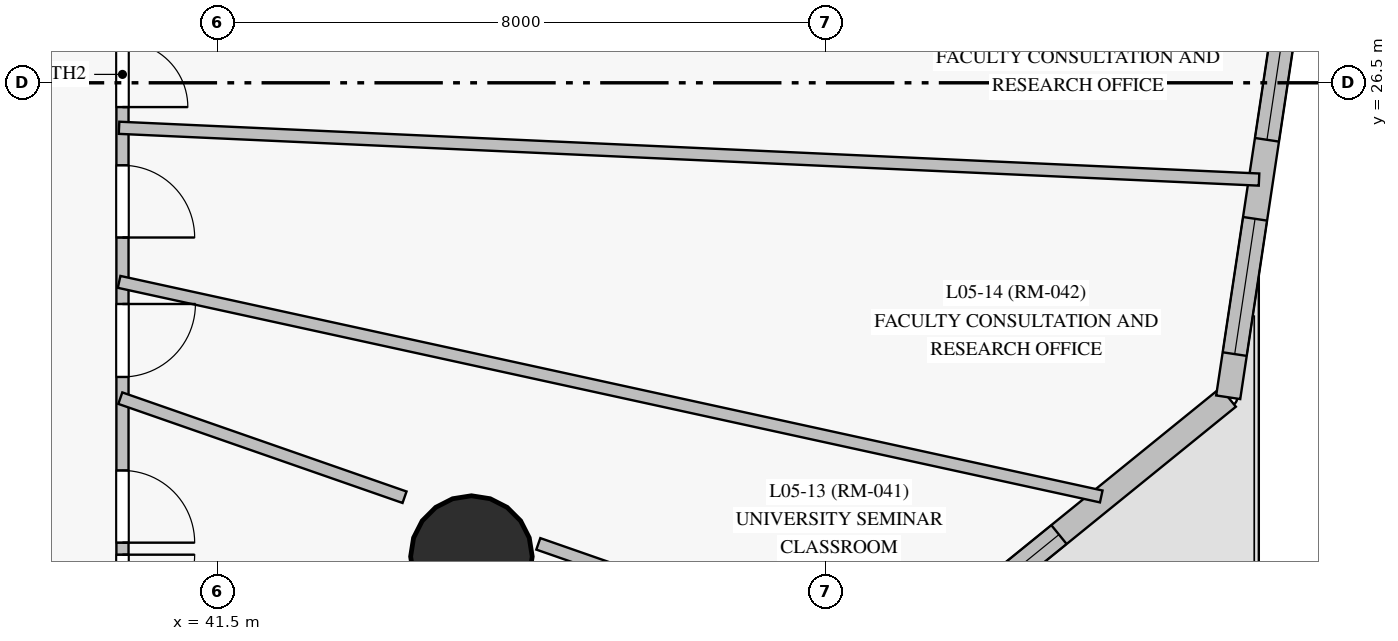
"""IFC4 building model, lengths in metres.
Left out: names, types, materials, properties, quantities, classifications, styles, units other than length and angle.
Written with IfcOpenShell. Run it as: python <this file> out.ifc"""

import sys

from ifc_helpers import new_model, si_unit, direction, frame, frame_2d, origin, origin_with_axes, origin_2d, place, context, subcontext, project, spatial, rectangle, circle, extrude, source, transform, mapped, element, fill, save


model = new_model("IFC4")
c1 = context("Model", 3, precision=1e-05, world=origin(), true_north=direction((0.0, 1.0)))
c2 = subcontext(c1, "Body", "Model", "MODEL_VIEW")
j1 = project(units=[si_unit("LENGTHUNIT", "METRE"), si_unit("PLANEANGLEUNIT", "RADIAN")], contexts=[c1])
p1 = place(None, origin())
s1 = spatial("IfcSite", under=j1, at=p1, CompositionType="ELEMENT")
p2 = place(p1, origin())
s2 = spatial("IfcBuilding", under=s1, at=p2, CompositionType="ELEMENT")
p3 = place(p2, frame((0.0, 0.0, 22.5)))
s3 = spatial("IfcBuildingStorey", under=s2, at=p3, CompositionType="ELEMENT", Elevation=22.5)
m1 = source(origin_with_axes(), c2, "Body", "SweptSolid", [
    extrude(circle(Radius=0.8, at=origin_2d()), origin(), (0.0, 0.0, 1.0), 4.0),
])
p4 = place(p3, frame((44.841, 20.267, 0.0), z_axis=(0.0, 0.0, 1.0), x_axis=(1.0, 0.0, 0.0)))
e1 = element("IfcColumn", 1, at=p4, inside=s3, PredefinedType="COLUMN", context=c2, shape_type="MappedRepresentation", body=[
    mapped(m1, transform((0.0, 0.0, 0.0), scale=1.0)),
])
p5 = place(p3, frame((42.227, 12.163, 0.0), z_axis=(0.0, 0.0, 1.0), x_axis=(0.776540545202, 0.630067283437, 0.0)))
e2 = element("IfcWall", 2, at=p5, inside=s3, PredefinedType="SOLIDWALL", context=c2, shape_type="SweptSolid", body=[
    extrude(rectangle(XDim=16.188, YDim=0.32, at=frame_2d((8.094, 0.0))), origin(), (0.0, 0.0, 1.0), 3.75),
])
p6 = place(p5, frame((0.678, 0.0, 0.85)))
e3 = element("IfcOpeningElement", 3, at=p6, cuts=e2, PredefinedType="OPENING", context=c2, shape_type="SweptSolid", body=[
    extrude(rectangle(XDim=2.1, YDim=1.95, at=frame_2d((1.05, 0.975))), frame((0.0, 0.17, 0.0), z_axis=(0.0, -1.0, 0.0), x_axis=(1.0, 0.0, 0.0)), (0.0, 0.0, 1.0), 0.34),
])
p7 = place(p5, frame((5.896, 0.0, 0.85)))
e4 = element("IfcOpeningElement", 4, at=p7, cuts=e2, PredefinedType="OPENING", context=c2, shape_type="SweptSolid", body=[
    extrude(rectangle(XDim=2.1, YDim=1.95, at=frame_2d((1.05, 0.975))), frame((0.0, 0.17, 0.0), z_axis=(0.0, -1.0, 0.0), x_axis=(1.0, 0.0, 0.0)), (0.0, 0.0, 1.0), 0.34),
])
p8 = place(p5, frame((11.221, 0.0, 0.85)))
e5 = element("IfcOpeningElement", 5, at=p8, cuts=e2, PredefinedType="OPENING", context=c2, shape_type="SweptSolid", body=[
    extrude(rectangle(XDim=2.1, YDim=1.95, at=frame_2d((1.05, 0.975))), frame((0.0, 0.17, 0.0), z_axis=(0.0, -1.0, 0.0), x_axis=(1.0, 0.0, 0.0)), (0.0, 0.0, 1.0), 0.34),
])
p9 = place(p3, frame((54.797, 22.363, 0.0), z_axis=(0.0, 0.0, 1.0), x_axis=(0.148832722849, 0.988862387094, 0.0)))
e6 = element("IfcWall", 6, at=p9, inside=s3, PredefinedType="SOLIDWALL", context=c2, shape_type="SweptSolid", body=[
    extrude(rectangle(XDim=10.767, YDim=0.32, at=frame_2d((5.384, 0.0))), origin(), (0.0, 0.0, 1.0), 3.75),
])
p10 = place(p9, frame((0.574, 0.0, 0.85)))
e7 = element("IfcOpeningElement", 7, at=p10, cuts=e6, PredefinedType="OPENING", context=c2, shape_type="SweptSolid", body=[
    extrude(rectangle(XDim=1.8, YDim=1.85, at=frame_2d((0.9, 0.925))), frame((0.0, 0.17, 0.0), z_axis=(0.0, -1.0, 0.0), x_axis=(1.0, 0.0, 0.0)), (0.0, 0.0, 1.0), 0.34),
])
p11 = place(p9, frame((3.426, 0.0, 0.85)))
e8 = element("IfcOpeningElement", 8, at=p11, cuts=e6, PredefinedType="OPENING", context=c2, shape_type="SweptSolid", body=[
    extrude(rectangle(XDim=2.1, YDim=1.95, at=frame_2d((1.05, 0.975))), frame((0.0, 0.17, 0.0), z_axis=(0.0, -1.0, 0.0), x_axis=(1.0, 0.0, 0.0)), (0.0, 0.0, 1.0), 0.34),
])
p12 = place(p9, frame((8.734, 0.0, 0.85)))
e9 = element("IfcOpeningElement", 9, at=p12, cuts=e6, PredefinedType="OPENING", context=c2, shape_type="SweptSolid", body=[
    extrude(rectangle(XDim=1.5, YDim=1.85, at=frame_2d((0.75, 0.925))), frame((0.0, 0.17, 0.0), z_axis=(0.0, -1.0, 0.0), x_axis=(1.0, 0.0, 0.0)), (0.0, 0.0, 1.0), 0.34),
])
p13 = place(p3, frame((40.25, 37.65, 0.0), z_axis=(0.0, 0.0, 1.0), x_axis=(0.0, -1.0, 0.0)))
e10 = element("IfcWall", 10, at=p13, inside=s3, PredefinedType="PARTITIONING", context=c2, shape_type="SweptSolid", body=[
    extrude(rectangle(XDim=22.3, YDim=0.16, at=frame_2d((11.15, 0.0))), origin(), (0.0, 0.0, 1.0), 3.15),
])
p14 = place(p13, frame((16.25, 0.0, 0.0)))
e11 = element("IfcOpeningElement", 11, at=p14, cuts=e10, PredefinedType="OPENING", context=c2, shape_type="SweptSolid", body=[
    extrude(rectangle(XDim=0.95, YDim=2.15, at=frame_2d((0.475, 1.075))), frame((0.0, 0.09, 0.0), z_axis=(0.0, -1.0, 0.0), x_axis=(1.0, 0.0, 0.0)), (0.0, 0.0, 1.0), 0.18),
])
p15 = place(p13, frame((14.06, 0.0, 0.0)))
e12 = element("IfcOpeningElement", 12, at=p15, cuts=e10, PredefinedType="OPENING", context=c2, shape_type="SweptSolid", body=[
    extrude(rectangle(XDim=0.96, YDim=2.15, at=frame_2d((0.48, 1.075))), frame((0.0, 0.09, 0.0), z_axis=(0.0, -1.0, 0.0), x_axis=(1.0, 0.0, 0.0)), (0.0, 0.0, 1.0), 0.18),
])
p16 = place(p13, frame((12.235, 0.0, 0.0)))
e13 = element("IfcOpeningElement", 13, at=p16, cuts=e10, PredefinedType="OPENING", context=c2, shape_type="SweptSolid", body=[
    extrude(rectangle(XDim=0.95, YDim=2.15, at=frame_2d((0.475, 1.075))), frame((0.0, 0.09, 0.0), z_axis=(0.0, -1.0, 0.0), x_axis=(1.0, 0.0, 0.0)), (0.0, 0.0, 1.0), 0.18),
])
p17 = place(p13, frame((4.385, 0.0, 0.0)))
e14 = element("IfcOpeningElement", 14, at=p17, cuts=e10, PredefinedType="OPENING", context=c2, shape_type="SweptSolid", body=[
    extrude(rectangle(XDim=0.95, YDim=2.15, at=frame_2d((0.475, 1.075))), frame((0.0, 0.09, 0.0), z_axis=(0.0, -1.0, 0.0), x_axis=(1.0, 0.0, 0.0)), (0.0, 0.0, 1.0), 0.18),
])
p18 = place(p13, frame((2.19, 0.0, 0.0)))
e15 = element("IfcOpeningElement", 15, at=p18, cuts=e10, PredefinedType="OPENING", context=c2, shape_type="SweptSolid", body=[
    extrude(rectangle(XDim=0.95, YDim=2.15, at=frame_2d((0.475, 1.075))), frame((0.0, 0.09, 0.0), z_axis=(0.0, -1.0, 0.0), x_axis=(1.0, 0.0, 0.0)), (0.0, 0.0, 1.0), 0.18),
])
p19 = place(p13, frame((17.358, 0.0, 0.0)))
e16 = element("IfcOpeningElement", 16, at=p19, cuts=e10, PredefinedType="OPENING", context=c2, shape_type="SweptSolid", body=[
    extrude(rectangle(XDim=0.95, YDim=2.15, at=frame_2d((0.475, 1.075))), frame((0.0, 0.09, 0.0), z_axis=(0.0, -1.0, 0.0), x_axis=(1.0, 0.0, 0.0)), (0.0, 0.0, 1.0), 0.18),
])
p20 = place(p13, frame((18.489, 0.0, 0.0)))
e17 = element("IfcOpeningElement", 17, at=p20, cuts=e10, PredefinedType="OPENING", context=c2, shape_type="SweptSolid", body=[
    extrude(rectangle(XDim=0.95, YDim=2.15, at=frame_2d((0.475, 1.075))), frame((0.0, 0.09, 0.0), z_axis=(0.0, -1.0, 0.0), x_axis=(1.0, 0.0, 0.0)), (0.0, 0.0, 1.0), 0.18),
])
p21 = place(p13, frame((10.61, 0.0, 0.0)))
e18 = element("IfcOpeningElement", 18, at=p21, cuts=e10, PredefinedType="OPENING", context=c2, shape_type="SweptSolid", body=[
    extrude(rectangle(XDim=0.86, YDim=2.04, at=frame_2d((0.43, 1.02))), frame((0.0, 0.09, 0.0), z_axis=(0.0, -1.0, 0.0), x_axis=(1.0, 0.0, 0.0)), (0.0, 0.0, 1.0), 0.18),
])
p22 = place(p13, frame((8.378, 0.0, 0.0)))
e19 = element("IfcOpeningElement", 19, at=p22, cuts=e10, PredefinedType="OPENING", context=c2, shape_type="SweptSolid", body=[
    extrude(rectangle(XDim=0.86, YDim=2.04, at=frame_2d((0.43, 1.02))), frame((0.0, 0.09, 0.0), z_axis=(0.0, -1.0, 0.0), x_axis=(1.0, 0.0, 0.0)), (0.0, 0.0, 1.0), 0.18),
])
p23 = place(p13, frame((7.144, 0.0, 0.0)))
e20 = element("IfcOpeningElement", 20, at=p23, cuts=e10, PredefinedType="OPENING", context=c2, shape_type="SweptSolid", body=[
    extrude(rectangle(XDim=0.86, YDim=2.04, at=frame_2d((0.43, 1.02))), frame((0.0, 0.09, 0.0), z_axis=(0.0, -1.0, 0.0), x_axis=(1.0, 0.0, 0.0)), (0.0, 0.0, 1.0), 0.18),
])
p24 = place(p3, frame((40.205, 25.908, 0.0), z_axis=(0.0, 0.0, 1.0), x_axis=(0.998969512327, -0.045386269292, 0.0)))
e21 = element("IfcWall", 21, at=p24, inside=s3, PredefinedType="PARTITIONING", context=c2, shape_type="SweptSolid", body=[
    extrude(rectangle(XDim=15.013, YDim=0.16, at=frame_2d((7.507, 0.0))), origin(), (0.0, 0.0, 1.0), 3.75),
])
p25 = place(p3, frame((40.206, 23.881, 0.0), z_axis=(0.0, 0.0, 1.0), x_axis=(0.976950568719, -0.213465655972, 0.0)))
e22 = element("IfcWall", 22, at=p25, inside=s3, PredefinedType="PARTITIONING", context=c2, shape_type="SweptSolid", body=[
    extrude(rectangle(XDim=13.226, YDim=0.16, at=frame_2d((6.613, 0.0))), origin(), (0.0, 0.0, 1.0), 3.75),
])
p26 = place(p3, frame((45.721, 20.434, 0.0), z_axis=(0.0, 0.0, 1.0), x_axis=(0.944295205847, -0.329099626578, 0.0)))
e23 = element("IfcWall", 23, at=p26, inside=s3, PredefinedType="PARTITIONING", context=c2, shape_type="SweptSolid", body=[
    extrude(rectangle(XDim=4.922, YDim=0.16, at=frame_2d((2.461, 0.0))), origin(), (0.0, 0.0, 1.0), 3.75),
])
p27 = place(p3, frame((40.222, 22.351, 0.0), z_axis=(0.0, 0.0, 1.0), x_axis=(0.944292001394, -0.329108821066, 0.0)))
e24 = element("IfcWall", 24, at=p27, inside=s3, PredefinedType="PARTITIONING", context=c2, shape_type="SweptSolid", body=[
    extrude(rectangle(XDim=3.96, YDim=0.16, at=frame_2d((1.98, 0.0))), origin(), (0.0, 0.0, 1.0), 3.75),
])
m2 = source(origin_with_axes(), c2, "Body", "SweptSolid", [
    extrude(rectangle(XDim=2.1, YDim=1.95, at=frame_2d((1.05, 0.975))), frame((0.0, 0.03, 0.0), z_axis=(0.0, -1.0, 0.0), x_axis=(1.0, 0.0, 0.0)), (0.0, 0.0, 1.0), 0.06),
])
p28 = place(p8, origin())
e25 = element("IfcWindow", 25, at=p28, inside=s3, PartitioningType="SINGLE_PANEL", PredefinedType="WINDOW", context=c2, shape_type="MappedRepresentation", body=[
    mapped(m2, transform((0.0, 0.0, 0.0), scale=1.0)),
])
fill(e5, e25)
m3 = source(origin_with_axes(), c2, "Body", "SweptSolid", [
    extrude(rectangle(XDim=1.8, YDim=1.85, at=frame_2d((0.9, 0.925))), frame((0.0, 0.03, 0.0), z_axis=(0.0, -1.0, 0.0), x_axis=(1.0, 0.0, 0.0)), (0.0, 0.0, 1.0), 0.06),
])
p29 = place(p10, origin())
e26 = element("IfcWindow", 26, at=p29, inside=s3, PartitioningType="SINGLE_PANEL", PredefinedType="WINDOW", context=c2, shape_type="MappedRepresentation", body=[
    mapped(m3, transform((0.0, 0.0, 0.0), scale=1.0)),
])
fill(e7, e26)
p30 = place(p11, origin())
e27 = element("IfcWindow", 27, at=p30, inside=s3, PartitioningType="SINGLE_PANEL", PredefinedType="WINDOW", context=c2, shape_type="MappedRepresentation", body=[
    mapped(m2, transform((0.0, 0.0, 0.0), scale=1.0)),
])
fill(e8, e27)
m4 = source(origin_with_axes(), c2, "Body", "SweptSolid", [
    extrude(rectangle(XDim=0.95, YDim=2.15, at=frame_2d((0.475, 1.075))), frame((0.0, 0.025, 0.0), z_axis=(0.0, -1.0, 0.0), x_axis=(1.0, 0.0, 0.0)), (0.0, 0.0, 1.0), 0.05),
])
p31 = place(p14, origin())
e28 = element("IfcDoor", 28, at=p31, inside=s3, OperationType="SINGLE_SWING_RIGHT", PredefinedType="DOOR", context=c2, shape_type="MappedRepresentation", body=[
    mapped(m4, transform((0.0, 0.0, 0.0), scale=1.0)),
])
fill(e11, e28)
m5 = source(origin_with_axes(), c2, "Body", "SweptSolid", [
    extrude(rectangle(XDim=0.96, YDim=2.15, at=frame_2d((0.48, 1.075))), frame((0.0, 0.025, 0.0), z_axis=(0.0, -1.0, 0.0), x_axis=(1.0, 0.0, 0.0)), (0.0, 0.0, 1.0), 0.05),
])
p32 = place(p15, origin())
e29 = element("IfcDoor", 29, at=p32, inside=s3, OperationType="SINGLE_SWING_LEFT", PredefinedType="DOOR", context=c2, shape_type="MappedRepresentation", body=[
    mapped(m5, transform((0.0, 0.0, 0.0), scale=1.0)),
])
fill(e12, e29)
p33 = place(p16, origin())
e30 = element("IfcDoor", 30, at=p33, inside=s3, OperationType="SINGLE_SWING_RIGHT", PredefinedType="DOOR", context=c2, shape_type="MappedRepresentation", body=[
    mapped(m4, transform((0.0, 0.0, 0.0), scale=1.0)),
])
fill(e13, e30)
p34 = place(p19, origin())
e31 = element("IfcDoor", 31, at=p34, inside=s3, OperationType="SINGLE_SWING_LEFT", PredefinedType="DOOR", context=c2, shape_type="MappedRepresentation", body=[
    mapped(m4, transform((0.0, 0.0, 0.0), scale=1.0)),
])
fill(e16, e31)
m6 = source(origin_with_axes(), c2, "Body", "SweptSolid", [
    extrude(rectangle(XDim=0.86, YDim=2.04, at=frame_2d((0.43, 1.02))), frame((0.0, 0.025, 0.0), z_axis=(0.0, -1.0, 0.0), x_axis=(1.0, 0.0, 0.0)), (0.0, 0.0, 1.0), 0.05),
])
p35 = place(p21, origin())
e32 = element("IfcDoor", 32, at=p35, inside=s3, OperationType="SINGLE_SWING_RIGHT", PredefinedType="DOOR", context=c2, shape_type="MappedRepresentation", body=[
    mapped(m6, transform((0.0, 0.0, 0.0), scale=1.0)),
])
fill(e18, e32)
save(model, sys.argv[1])
